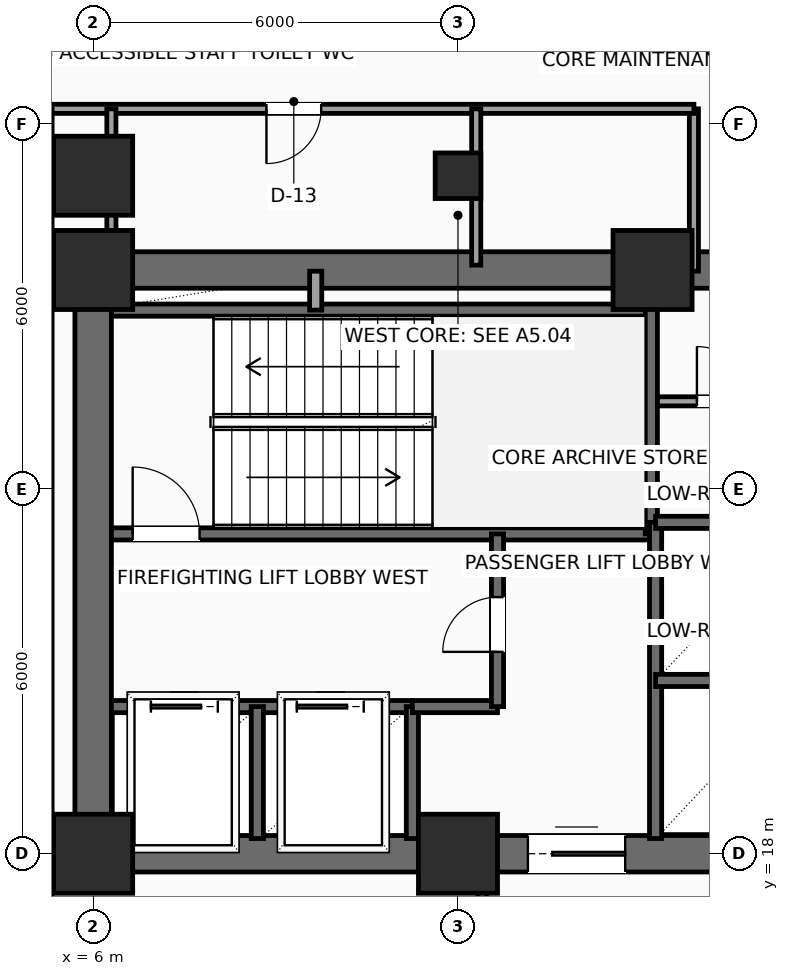
"""IFC4 building model, lengths in metres.
Left out: names, types, materials, properties, quantities, classifications, styles, units other than length and angle.
Written with IfcOpenShell. Run it as: python <this file> out.ifc"""

import sys

from ifc_helpers import new_model, si_unit, direction, frame, frame_2d, origin, origin_2d, place, context, subcontext, project, spatial, rectangle, hollow_rectangle, extrude, element, fill, save


model = new_model("IFC4")
c1 = context("Model", 3, precision=1e-05, world=origin(), true_north=direction((0.0, 1.0)))
c2 = subcontext(c1, "Body", "Model", "MODEL_VIEW")
j1 = project(units=[si_unit("LENGTHUNIT", "METRE"), si_unit("PLANEANGLEUNIT", "RADIAN")], contexts=[c1])
p1 = place(None, origin())
s1 = spatial("IfcSite", under=j1, at=p1, CompositionType="ELEMENT")
p2 = place(p1, origin())
s2 = spatial("IfcBuilding", under=s1, at=p2, CompositionType="ELEMENT")
p3 = place(p2, frame((0.0, 0.0, 67.5)))
s3 = spatial("IfcBuildingStorey", under=s2, at=p3, CompositionType="ELEMENT", Elevation=67.5)
for number, where, z_axis, x_axis in (
    (1, (6.0, 18.0, 0.0), (0.0, 0.0, 1.0), (1.0, 0.0, 0.0)),
    (2, (12.0, 18.0, 0.0), (0.0, 0.0, 1.0), (1.0, 0.0, 0.0)),
    (3, (6.0, 27.6, 0.0), (0.0, 0.0, 1.0), (1.0, 0.0, 0.0)),
    (4, (15.2, 27.6, 0.0), (0.0, 0.0, 1.0), (1.0, 0.0, 0.0)),
    (5, (6.0, 29.15, 0.0), (0.0, 0.0, 1.0), (1.0, 0.0, 0.0)),
):
    element("IfcColumn", number, at=place(p3, frame(where, z_axis=z_axis, x_axis=x_axis)), inside=s3, PredefinedType="COLUMN", context=c2, shape_type="SweptSolid", body=[
        extrude(rectangle(XDim=1.3, YDim=1.3, at=origin_2d()), origin(), (0.0, 0.0, 1.0), 3.9),
    ])
p4 = place(p3, frame((12.0, 29.15, 0.0), z_axis=(0.0, 0.0, 1.0), x_axis=(1.0, 0.0, 0.0)))
e6 = element("IfcColumn", 6, at=p4, inside=s3, PredefinedType="COLUMN", context=c2, shape_type="SweptSolid", body=[
    extrude(hollow_rectangle(XDim=0.75, YDim=0.75, WallThickness=0.035, InnerFilletRadius=0.035, OuterFilletRadius=0.05, at=origin_2d()), origin(), (0.0, 0.0, 1.0), 3.9),
])
p5 = place(p3, frame((6.0, 18.0, 0.0), z_axis=(0.0, 0.0, 1.0), x_axis=(1.0, 0.0, 0.0)))
e7 = element("IfcWall", 7, at=p5, inside=s3, PredefinedType="SHEAR", context=c2, shape_type="SweptSolid", body=[
    extrude(rectangle(XDim=12.0, YDim=0.6, at=frame_2d((6.0, 0.0))), origin(), (0.0, 0.0, 1.0), 3.65),
])
p6 = place(p5, frame((7.15, 0.0, 0.0)))
e8 = element("IfcOpeningElement", 8, at=p6, cuts=e7, PredefinedType="OPENING", context=c2, shape_type="SweptSolid", body=[
    extrude(rectangle(XDim=1.6, YDim=2.3, at=frame_2d((0.8, 1.15))), frame((0.0, 0.31, 0.0), z_axis=(0.0, -1.0, 0.0), x_axis=(1.0, 0.0, 0.0)), (0.0, 0.0, 1.0), 0.62),
])
p7 = place(p3, frame((6.0, 27.6, 0.0), z_axis=(0.0, 0.0, 1.0), x_axis=(1.0, 0.0, 0.0)))
e9 = element("IfcWall", 9, at=p7, inside=s3, PredefinedType="SHEAR", context=c2, shape_type="SweptSolid", body=[
    extrude(rectangle(XDim=12.0, YDim=0.6, at=frame_2d((6.0, 0.0))), origin(), (0.0, 0.0, 1.0), 3.65),
])
p8 = place(p7, frame((10.2, 0.0, 0.0)))
e10 = element("IfcOpeningElement", 10, at=p8, cuts=e9, PredefinedType="OPENING", context=c2, shape_type="SweptSolid", body=[
    extrude(rectangle(XDim=0.9, YDim=2.15, at=frame_2d((0.45, 1.075))), frame((0.0, 0.31, 0.0), z_axis=(0.0, -1.0, 0.0), x_axis=(1.0, 0.0, 0.0)), (0.0, 0.0, 1.0), 0.62),
])
p9 = place(p3, frame((6.0, 18.0, 0.0), z_axis=(0.0, 0.0, 1.0), x_axis=(0.0, 1.0, 0.0)))
e11 = element("IfcWall", 11, at=p9, inside=s3, PredefinedType="SHEAR", context=c2, shape_type="SweptSolid", body=[
    extrude(rectangle(XDim=9.6, YDim=0.6, at=frame_2d((4.8, 0.0))), origin(), (0.0, 0.0, 1.0), 3.65),
])
p10 = place(p3, frame((6.3, 23.26, 0.0), z_axis=(0.0, 0.0, 1.0), x_axis=(1.0, 0.0, 0.0)))
e12 = element("IfcWall", 12, at=p10, inside=s3, PredefinedType="SHEAR", context=c2, shape_type="SweptSolid", body=[
    extrude(rectangle(XDim=8.88, YDim=0.2, at=frame_2d((4.44, 0.0))), origin(), (0.0, 0.0, 1.0), 3.65),
])
p11 = place(p10, frame((0.35, 0.0, 0.0)))
e13 = element("IfcOpeningElement", 13, at=p11, cuts=e12, PredefinedType="OPENING", context=c2, shape_type="SweptSolid", body=[
    extrude(rectangle(XDim=1.1, YDim=2.2, at=frame_2d((0.55, 1.1))), frame((0.0, 0.11, 0.0), z_axis=(0.0, -1.0, 0.0), x_axis=(1.0, 0.0, 0.0)), (0.0, 0.0, 1.0), 0.22),
])
p12 = place(p3, frame((6.3, 26.94, 0.0), z_axis=(0.0, 0.0, 1.0), x_axis=(1.0, 0.0, 0.0)))
e14 = element("IfcWall", 14, at=p12, inside=s3, PredefinedType="SHEAR", context=c2, shape_type="SweptSolid", body=[
    extrude(rectangle(XDim=8.88, YDim=0.2, at=frame_2d((4.44, 0.0))), origin(), (0.0, 0.0, 1.0), 3.65),
])
p13 = place(p3, frame((15.18, 23.26, 0.0), z_axis=(0.0, 0.0, 1.0), x_axis=(0.0, 1.0, 0.0)))
e15 = element("IfcWall", 15, at=p13, inside=s3, PredefinedType="SHEAR", context=c2, shape_type="SweptSolid", body=[
    extrude(rectangle(XDim=4.04, YDim=0.2, at=frame_2d((2.02, 0.0))), origin(), (0.0, 0.0, 1.0), 3.65),
])
p14 = place(p3, frame((6.3, 20.42, 0.0), z_axis=(0.0, 0.0, 1.0), x_axis=(1.0, 0.0, 0.0)))
e16 = element("IfcWall", 16, at=p14, inside=s3, PredefinedType="SHEAR", context=c2, shape_type="SweptSolid", body=[
    extrude(rectangle(XDim=4.95, YDim=0.2, at=frame_2d((2.475, 0.0))), origin(), (0.0, 0.0, 1.0), 3.65),
])
p15 = place(p14, frame((0.65, 0.0, 0.0)))
e17 = element("IfcOpeningElement", 17, at=p15, cuts=e16, PredefinedType="OPENING", context=c2, shape_type="SweptSolid", body=[
    extrude(rectangle(XDim=1.1, YDim=2.2, at=frame_2d((0.55, 1.1))), frame((0.0, 0.11, 0.0), z_axis=(0.0, -1.0, 0.0), x_axis=(1.0, 0.0, 0.0)), (0.0, 0.0, 1.0), 0.22),
])
p16 = place(p14, frame((3.05, 0.0, 0.0)))
e18 = element("IfcOpeningElement", 18, at=p16, cuts=e16, PredefinedType="OPENING", context=c2, shape_type="SweptSolid", body=[
    extrude(rectangle(XDim=1.1, YDim=2.2, at=frame_2d((0.55, 1.1))), frame((0.0, 0.11, 0.0), z_axis=(0.0, -1.0, 0.0), x_axis=(1.0, 0.0, 0.0)), (0.0, 0.0, 1.0), 0.22),
])
for number, where, z_axis, x_axis in (
    (19, (8.7, 18.25, 0.0), (0.0, 0.0, 1.0), (0.0, 1.0, 0.0)),
    (20, (11.25, 18.25, 0.0), (0.0, 0.0, 1.0), (0.0, 1.0, 0.0)),
):
    element("IfcWall", number, at=place(p3, frame(where, z_axis=z_axis, x_axis=x_axis)), inside=s3, PredefinedType="SHEAR", context=c2, shape_type="SweptSolid", body=[
        extrude(rectangle(XDim=2.17, YDim=0.2, at=frame_2d((1.085, 0.0))), origin(), (0.0, 0.0, 1.0), 3.65),
    ])
p17 = place(p3, frame((11.25, 20.42, 0.0), z_axis=(0.0, 0.0, 1.0), x_axis=(1.0, 0.0, 0.0)))
e21 = element("IfcWall", 21, at=p17, inside=s3, PredefinedType="SHEAR", context=c2, shape_type="SweptSolid", body=[
    extrude(rectangle(XDim=1.4, YDim=0.2, at=frame_2d((0.7, 0.0))), origin(), (0.0, 0.0, 1.0), 3.65),
])
p18 = place(p3, frame((12.65, 20.42, 0.0), z_axis=(0.0, 0.0, 1.0), x_axis=(0.0, 1.0, 0.0)))
e22 = element("IfcWall", 22, at=p18, inside=s3, PredefinedType="SHEAR", context=c2, shape_type="SweptSolid", body=[
    extrude(rectangle(XDim=2.84, YDim=0.2, at=frame_2d((1.42, 0.0))), origin(), (0.0, 0.0, 1.0), 3.65),
])
p19 = place(p18, frame((0.9, 0.0, 0.0)))
e23 = element("IfcOpeningElement", 23, at=p19, cuts=e22, PredefinedType="OPENING", context=c2, shape_type="SweptSolid", body=[
    extrude(rectangle(XDim=0.9, YDim=2.15, at=frame_2d((0.45, 1.075))), frame((0.0, 0.11, 0.0), z_axis=(0.0, -1.0, 0.0), x_axis=(1.0, 0.0, 0.0)), (0.0, 0.0, 1.0), 0.22),
])
p20 = place(p3, frame((9.66, 26.94, 0.0), z_axis=(0.0, 0.0, 1.0), x_axis=(0.0, 1.0, 0.0)))
e24 = element("IfcWall", 24, at=p20, inside=s3, PredefinedType="SOLIDWALL", context=c2, shape_type="SweptSolid", body=[
    extrude(rectangle(XDim=0.64, YDim=0.2, at=frame_2d((0.32, 0.0))), origin(), (0.0, 0.0, 1.0), 3.65),
])
p21 = place(p3, frame((15.25, 18.25, 0.0), z_axis=(0.0, 0.0, 1.0), x_axis=(0.0, 1.0, 0.0)))
e25 = element("IfcWall", 25, at=p21, inside=s3, PredefinedType="SHEAR", context=c2, shape_type="SweptSolid", body=[
    extrude(rectangle(XDim=5.2, YDim=0.2, at=frame_2d((2.6, 0.0))), origin(), (0.0, 0.0, 1.0), 3.65),
])
p22 = place(p3, frame((15.25, 20.85, 0.0), z_axis=(0.0, 0.0, 1.0), x_axis=(1.0, 0.0, 0.0)))
e26 = element("IfcWall", 26, at=p22, inside=s3, PredefinedType="SHEAR", context=c2, shape_type="SweptSolid", body=[
    extrude(rectangle(XDim=2.4, YDim=0.2, at=frame_2d((1.2, 0.0))), origin(), (0.0, 0.0, 1.0), 3.65),
])
p23 = place(p3, frame((15.25, 23.45, 0.0), z_axis=(0.0, 0.0, 1.0), x_axis=(1.0, 0.0, 0.0)))
e27 = element("IfcWall", 27, at=p23, inside=s3, PredefinedType="SHEAR", context=c2, shape_type="SweptSolid", body=[
    extrude(rectangle(XDim=2.45, YDim=0.2, at=frame_2d((1.225, 0.0))), origin(), (0.0, 0.0, 1.0), 3.65),
])
p24 = place(p3, frame((15.28, 25.44, 0.0), z_axis=(0.0, 0.0, 1.0), x_axis=(1.0, 0.0, 0.0)))
e28 = element("IfcWall", 28, at=p24, inside=s3, PredefinedType="PARTITIONING", context=c2, shape_type="SweptSolid", body=[
    extrude(rectangle(XDim=2.42, YDim=0.15, at=frame_2d((1.21, 0.0))), origin(), (0.0, 0.0, 1.0), 3.65),
])
p25 = place(p24, frame((0.65, 0.0, 0.0)))
e29 = element("IfcOpeningElement", 29, at=p25, cuts=e28, PredefinedType="OPENING", context=c2, shape_type="SweptSolid", body=[
    extrude(rectangle(XDim=0.9, YDim=2.15, at=frame_2d((0.45, 1.075))), frame((0.0, 0.085, 0.0), z_axis=(0.0, -1.0, 0.0), x_axis=(1.0, 0.0, 0.0)), (0.0, 0.0, 1.0), 0.17),
])
p26 = place(p3, frame((15.88, 27.58, 0.0), z_axis=(0.0, 0.0, 1.0), x_axis=(0.0, 1.0, 0.0)))
e30 = element("IfcWall", 30, at=p26, inside=s3, PredefinedType="PARTITIONING", context=c2, shape_type="SweptSolid", body=[
    extrude(rectangle(XDim=2.67, YDim=0.15, at=frame_2d((1.335, 0.0))), origin(), (0.0, 0.0, 1.0), 3.65),
])
p27 = place(p3, frame((15.88, 30.25, 0.0), z_axis=(0.0, 0.0, 1.0), x_axis=(-1.0, 0.0, 0.0)))
e31 = element("IfcWall", 31, at=p27, inside=s3, PredefinedType="PARTITIONING", context=c2, shape_type="SweptSolid", body=[
    extrude(rectangle(XDim=10.63, YDim=0.15, at=frame_2d((5.315, 0.0))), origin(), (0.0, 0.0, 1.0), 3.65),
])
p28 = place(p27, frame((6.13, 0.0, 0.0)))
e32 = element("IfcOpeningElement", 32, at=p28, cuts=e31, PredefinedType="OPENING", context=c2, shape_type="SweptSolid", body=[
    extrude(rectangle(XDim=0.9, YDim=2.1, at=frame_2d((0.45, 1.05))), frame((0.0, 0.085, 0.0), z_axis=(0.0, -1.0, 0.0), x_axis=(1.0, 0.0, 0.0)), (0.0, 0.0, 1.0), 0.17),
])
p29 = place(p3, frame((5.25, 30.25, 0.0), z_axis=(0.0, 0.0, 1.0), x_axis=(0.0, -1.0, 0.0)))
e33 = element("IfcWall", 33, at=p29, inside=s3, PredefinedType="PARTITIONING", context=c2, shape_type="SweptSolid", body=[
    extrude(rectangle(XDim=13.35, YDim=0.15, at=frame_2d((6.675, 0.0))), origin(), (0.0, 0.0, 1.0), 3.65),
])
p30 = place(p3, frame((12.4, 16.9, 0.0), z_axis=(0.0, 0.0, 1.0), x_axis=(0.0, 1.0, 0.0)))
e34 = element("IfcWall", 34, at=p30, inside=s3, PredefinedType="PARTITIONING", context=c2, shape_type="SweptSolid", body=[
    extrude(rectangle(XDim=1.05, YDim=0.15, at=frame_2d((0.525, 0.0))), origin(), (0.0, 0.0, 1.0), 3.65),
])
for number, where, z_axis, x_axis in (
    (35, (6.3, 27.68, 0.0), (0.0, 0.0, 1.0), (0.0, 1.0, 0.0)),
    (36, (12.3, 27.68, 0.0), (0.0, 0.0, 1.0), (0.0, 1.0, 0.0)),
):
    element("IfcWall", number, at=place(p3, frame(where, z_axis=z_axis, x_axis=x_axis)), inside=s3, PredefinedType="PARTITIONING", context=c2, shape_type="SweptSolid", body=[
        extrude(rectangle(XDim=2.57, YDim=0.15, at=frame_2d((1.285, 0.0))), origin(), (0.0, 0.0, 1.0), 2.992),
    ])
p31 = place(p6, origin())
e37 = element("IfcDoor", 37, at=p31, inside=s3, OperationType="DOUBLE_DOOR_SLIDING", PredefinedType="DOOR", context=c2, shape_type="SweptSolid", body=[
    extrude(rectangle(XDim=1.6, YDim=2.3, at=frame_2d((0.8, 1.15))), frame((0.0, 0.025, 0.0), z_axis=(0.0, -1.0, 0.0), x_axis=(1.0, 0.0, 0.0)), (0.0, 0.0, 1.0), 0.05),
])
fill(e8, e37)
p32 = place(p11, origin())
e38 = element("IfcDoor", 38, at=p32, inside=s3, OperationType="SINGLE_SWING_LEFT", PredefinedType="DOOR", context=c2, shape_type="SweptSolid", body=[
    extrude(rectangle(XDim=1.1, YDim=2.2, at=frame_2d((0.55, 1.1))), frame((0.0, 0.025, 0.0), z_axis=(0.0, -1.0, 0.0), x_axis=(1.0, 0.0, 0.0)), (0.0, 0.0, 1.0), 0.05),
])
fill(e13, e38)
p33 = place(p15, origin())
e39 = element("IfcDoor", 39, at=p33, inside=s3, OperationType="SLIDING_TO_LEFT", PredefinedType="DOOR", context=c2, shape_type="SweptSolid", body=[
    extrude(rectangle(XDim=1.1, YDim=2.2, at=frame_2d((0.55, 1.1))), frame((0.0, 0.025, 0.0), z_axis=(0.0, -1.0, 0.0), x_axis=(1.0, 0.0, 0.0)), (0.0, 0.0, 1.0), 0.05),
])
fill(e17, e39)
p34 = place(p16, origin())
e40 = element("IfcDoor", 40, at=p34, inside=s3, OperationType="SLIDING_TO_LEFT", PredefinedType="DOOR", context=c2, shape_type="SweptSolid", body=[
    extrude(rectangle(XDim=1.1, YDim=2.2, at=frame_2d((0.55, 1.1))), frame((0.0, 0.025, 0.0), z_axis=(0.0, -1.0, 0.0), x_axis=(1.0, 0.0, 0.0)), (0.0, 0.0, 1.0), 0.05),
])
fill(e18, e40)
p35 = place(p19, origin())
e41 = element("IfcDoor", 41, at=p35, inside=s3, OperationType="SINGLE_SWING_LEFT", PredefinedType="DOOR", context=c2, shape_type="SweptSolid", body=[
    extrude(rectangle(XDim=0.9, YDim=2.15, at=frame_2d((0.45, 1.075))), frame((0.0, 0.025, 0.0), z_axis=(0.0, -1.0, 0.0), x_axis=(1.0, 0.0, 0.0)), (0.0, 0.0, 1.0), 0.05),
])
fill(e23, e41)
p36 = place(p25, origin())
e42 = element("IfcDoor", 42, at=p36, inside=s3, OperationType="SINGLE_SWING_LEFT", PredefinedType="DOOR", context=c2, shape_type="SweptSolid", body=[
    extrude(rectangle(XDim=0.9, YDim=2.15, at=frame_2d((0.45, 1.075))), frame((0.0, 0.025, 0.0), z_axis=(0.0, -1.0, 0.0), x_axis=(1.0, 0.0, 0.0)), (0.0, 0.0, 1.0), 0.05),
])
fill(e29, e42)
p37 = place(p28, origin())
e43 = element("IfcDoor", 43, at=p37, inside=s3, OperationType="SINGLE_SWING_RIGHT", PredefinedType="DOOR", context=c2, shape_type="SweptSolid", body=[
    extrude(rectangle(XDim=0.9, YDim=2.1, at=frame_2d((0.45, 1.05))), frame((0.0, 0.025, 0.0), z_axis=(0.0, -1.0, 0.0), x_axis=(1.0, 0.0, 0.0)), (0.0, 0.0, 1.0), 0.05),
])
fill(e32, e43)
save(model, sys.argv[1])
